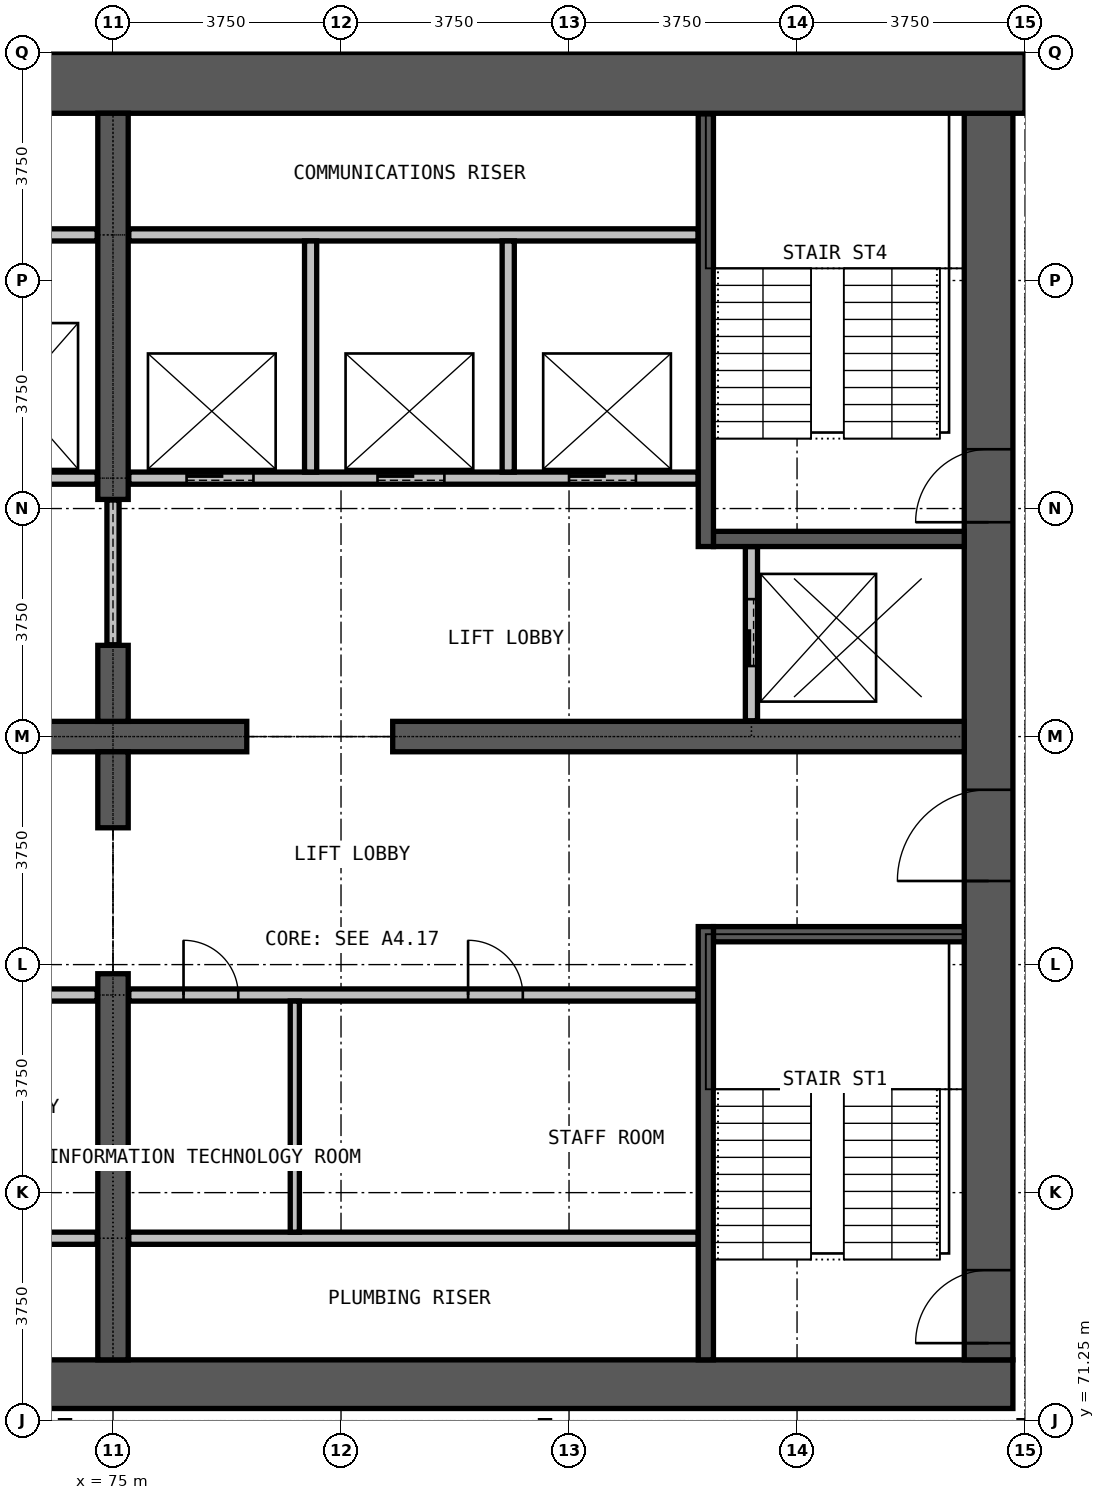
"""IFC4 building model, lengths in metres.
Left out: names, types, materials, properties, quantities, classifications, styles, units other than length and angle.
Written with IfcOpenShell. Run it as: python <this file> out.ifc"""

import sys

from ifc_helpers import new_model, si_unit, direction, frame, frame_2d, origin, place, context, subcontext, project, spatial, rectangle, extrude, element, fill, save


model = new_model("IFC4")
c1 = context("Model", 3, precision=1e-05, world=origin(), true_north=direction((0.0, 1.0)))
c2 = subcontext(c1, "Body", "Model", "MODEL_VIEW")
j1 = project(units=[si_unit("LENGTHUNIT", "METRE"), si_unit("PLANEANGLEUNIT", "RADIAN")], contexts=[c1])
p1 = place(None, origin())
s1 = spatial("IfcSite", under=j1, at=p1, CompositionType="ELEMENT")
p2 = place(p1, origin())
s2 = spatial("IfcBuilding", under=s1, at=p2, CompositionType="ELEMENT")
p3 = place(p2, frame((0.0, 0.0, 162.1)))
s3 = spatial("IfcBuildingStorey", under=s2, at=p3, CompositionType="ELEMENT", Elevation=162.1)
p4 = place(p3, frame((60.2, 71.85, 0.0), z_axis=(0.0, 0.0, 1.0), x_axis=(1.0, 0.0, 0.0)))
e1 = element("IfcWall", 1, at=p4, inside=s3, PredefinedType="SHEAR", context=c2, shape_type="SweptSolid", body=[
    extrude(rectangle(XDim=29.6, YDim=0.8, at=frame_2d((14.8, 0.0))), origin(), (0.0, 0.0, 1.0), 3.6),
])
p5 = place(p3, frame((89.4, 72.25, 0.0), z_axis=(0.0, 0.0, 1.0), x_axis=(0.0, 1.0, 0.0)))
e2 = element("IfcWall", 2, at=p5, inside=s3, PredefinedType="SHEAR", context=c2, shape_type="SweptSolid", body=[
    extrude(rectangle(XDim=20.5, YDim=0.8, at=frame_2d((10.25, 0.0))), origin(), (0.0, 0.0, 1.0), 3.6),
])
p6 = place(p5, frame((0.275, 0.0, 0.0)))
e3 = element("IfcOpeningElement", 3, at=p6, cuts=e2, PredefinedType="OPENING", context=c2, shape_type="SweptSolid", body=[
    extrude(rectangle(XDim=1.2, YDim=2.2, at=frame_2d((0.6, 1.1))), frame((0.0, 0.41, 0.0), z_axis=(0.0, -1.0, 0.0), x_axis=(1.0, 0.0, 0.0)), (0.0, 0.0, 1.0), 0.82),
])
p7 = place(p5, frame((13.775, 0.0, 0.0)))
e4 = element("IfcOpeningElement", 4, at=p7, cuts=e2, PredefinedType="OPENING", context=c2, shape_type="SweptSolid", body=[
    extrude(rectangle(XDim=1.2, YDim=2.2, at=frame_2d((0.6, 1.1))), frame((0.0, 0.41, 0.0), z_axis=(0.0, -1.0, 0.0), x_axis=(1.0, 0.0, 0.0)), (0.0, 0.0, 1.0), 0.82),
])
p8 = place(p5, frame((7.875, 0.0, 0.0)))
e5 = element("IfcOpeningElement", 5, at=p8, cuts=e2, PredefinedType="OPENING", context=c2, shape_type="SweptSolid", body=[
    extrude(rectangle(XDim=1.5, YDim=2.2, at=frame_2d((0.75, 1.1))), frame((0.0, 0.41, 0.0), z_axis=(0.0, -1.0, 0.0), x_axis=(1.0, 0.0, 0.0)), (0.0, 0.0, 1.0), 0.82),
])
p9 = place(p3, frame((90.0, 93.25, 0.0), z_axis=(0.0, 0.0, 1.0), x_axis=(-1.0, 0.0, 0.0)))
e6 = element("IfcWall", 6, at=p9, inside=s3, PredefinedType="SHEAR", context=c2, shape_type="SweptSolid", body=[
    extrude(rectangle(XDim=30.0, YDim=1.0, at=frame_2d((15.0, 0.0))), origin(), (0.0, 0.0, 1.0), 3.6),
])
p10 = place(p3, frame((72.8, 82.5, 0.0), z_axis=(0.0, 0.0, 1.0), x_axis=(1.0, 0.0, 0.0)))
e7 = element("IfcWall", 7, at=p10, inside=s3, PredefinedType="SHEAR", context=c2, shape_type="SweptSolid", body=[
    extrude(rectangle(XDim=4.4, YDim=0.5, at=frame_2d((2.2, 0.0))), origin(), (0.0, 0.0, 1.0), 3.6),
])
p11 = place(p3, frame((79.6, 82.5, 0.0), z_axis=(0.0, 0.0, 1.0), x_axis=(1.0, 0.0, 0.0)))
e8 = element("IfcWall", 8, at=p11, inside=s3, PredefinedType="SHEAR", context=c2, shape_type="SweptSolid", body=[
    extrude(rectangle(XDim=9.4, YDim=0.5, at=frame_2d((4.7, 0.0))), origin(), (0.0, 0.0, 1.0), 3.6),
])
p12 = place(p3, frame((75.0, 72.25, 0.0), z_axis=(0.0, 0.0, 1.0), x_axis=(0.0, 1.0, 0.0)))
e9 = element("IfcWall", 9, at=p12, inside=s3, PredefinedType="SHEAR", context=c2, shape_type="SweptSolid", body=[
    extrude(rectangle(XDim=6.35, YDim=0.5, at=frame_2d((3.175, 0.0))), origin(), (0.0, 0.0, 1.0), 3.6),
])
for number, where, z_axis, x_axis in (
    (10, (75.0, 81.0, 0.0), (0.0, 0.0, 1.0), (0.0, 1.0, 0.0)),
    (11, (75.0, 82.75, 0.0), (0.0, 0.0, 1.0), (0.0, 1.0, 0.0)),
):
    element("IfcWall", number, at=place(p3, frame(where, z_axis=z_axis, x_axis=x_axis)), inside=s3, PredefinedType="SHEAR", context=c2, shape_type="SweptSolid", body=[
        extrude(rectangle(XDim=1.25, YDim=0.5, at=frame_2d((0.625, 0.0))), origin(), (0.0, 0.0, 1.0), 3.6),
    ])
p13 = place(p3, frame((75.0, 86.4, 0.0), z_axis=(0.0, 0.0, 1.0), x_axis=(0.0, 1.0, 0.0)))
e12 = element("IfcWall", 12, at=p13, inside=s3, PredefinedType="SHEAR", context=c2, shape_type="SweptSolid", body=[
    extrude(rectangle(XDim=6.35, YDim=0.5, at=frame_2d((3.175, 0.0))), origin(), (0.0, 0.0, 1.0), 3.6),
])
for number, where, z_axis, x_axis in (
    (13, (65.375, 74.25, 0.0), (0.0, 0.0, 1.0), (1.0, 0.0, 0.0)),
    (14, (75.26, 74.25, 0.0), (0.0, 0.0, 1.0), (1.0, 0.0, 0.0)),
):
    element("IfcWall", number, at=place(p3, frame(where, z_axis=z_axis, x_axis=x_axis)), inside=s3, PredefinedType="PARTITIONING", context=c2, shape_type="SweptSolid", body=[
        extrude(rectangle(XDim=9.365, YDim=0.2, at=frame_2d((4.683, 0.0))), origin(), (0.0, 0.0, 1.0), 3.3),
    ])
p14 = place(p3, frame((65.375, 78.25, 0.0), z_axis=(0.0, 0.0, 1.0), x_axis=(1.0, 0.0, 0.0)))
e15 = element("IfcWall", 15, at=p14, inside=s3, PredefinedType="PARTITIONING", context=c2, shape_type="SweptSolid", body=[
    extrude(rectangle(XDim=9.365, YDim=0.2, at=frame_2d((4.683, 0.0))), origin(), (0.0, 0.0, 1.0), 3.3),
])
p15 = place(p14, frame((1.9, 0.0, 0.0)))
e16 = element("IfcOpeningElement", 16, at=p15, cuts=e15, PredefinedType="OPENING", context=c2, shape_type="SweptSolid", body=[
    extrude(rectangle(XDim=0.9, YDim=2.2, at=frame_2d((0.45, 1.1))), frame((0.0, 0.11, 0.0), z_axis=(0.0, -1.0, 0.0), x_axis=(1.0, 0.0, 0.0)), (0.0, 0.0, 1.0), 0.22),
])
p16 = place(p14, frame((6.6, 0.0, 0.0)))
e17 = element("IfcOpeningElement", 17, at=p16, cuts=e15, PredefinedType="OPENING", context=c2, shape_type="SweptSolid", body=[
    extrude(rectangle(XDim=0.9, YDim=2.2, at=frame_2d((0.45, 1.1))), frame((0.0, 0.11, 0.0), z_axis=(0.0, -1.0, 0.0), x_axis=(1.0, 0.0, 0.0)), (0.0, 0.0, 1.0), 0.22),
])
p17 = place(p3, frame((75.26, 78.25, 0.0), z_axis=(0.0, 0.0, 1.0), x_axis=(1.0, 0.0, 0.0)))
e18 = element("IfcWall", 18, at=p17, inside=s3, PredefinedType="PARTITIONING", context=c2, shape_type="SweptSolid", body=[
    extrude(rectangle(XDim=9.365, YDim=0.2, at=frame_2d((4.683, 0.0))), origin(), (0.0, 0.0, 1.0), 3.3),
])
p18 = place(p17, frame((0.9, 0.0, 0.0)))
e19 = element("IfcOpeningElement", 19, at=p18, cuts=e18, PredefinedType="OPENING", context=c2, shape_type="SweptSolid", body=[
    extrude(rectangle(XDim=0.9, YDim=2.2, at=frame_2d((0.45, 1.1))), frame((0.0, 0.11, 0.0), z_axis=(0.0, -1.0, 0.0), x_axis=(1.0, 0.0, 0.0)), (0.0, 0.0, 1.0), 0.22),
])
p19 = place(p17, frame((5.58, 0.0, 0.0)))
e20 = element("IfcOpeningElement", 20, at=p19, cuts=e18, PredefinedType="OPENING", context=c2, shape_type="SweptSolid", body=[
    extrude(rectangle(XDim=0.9, YDim=2.2, at=frame_2d((0.45, 1.1))), frame((0.0, 0.11, 0.0), z_axis=(0.0, -1.0, 0.0), x_axis=(1.0, 0.0, 0.0)), (0.0, 0.0, 1.0), 0.22),
])
p20 = place(p3, frame((75.0, 84.01, 0.0), z_axis=(0.0, 0.0, 1.0), x_axis=(0.0, 1.0, 0.0)))
e21 = element("IfcWall", 21, at=p20, inside=s3, PredefinedType="PARTITIONING", context=c2, shape_type="SweptSolid", body=[
    extrude(rectangle(XDim=2.38, YDim=0.2, at=frame_2d((1.19, 0.0))), origin(), (0.0, 0.0, 1.0), 2.4),
])
p21 = place(p3, frame((77.99, 74.35, 0.0), z_axis=(0.0, 0.0, 1.0), x_axis=(0.0, 1.0, 0.0)))
e22 = element("IfcWall", 22, at=p21, inside=s3, PredefinedType="PARTITIONING", context=c2, shape_type="SweptSolid", body=[
    extrude(rectangle(XDim=3.8, YDim=0.15, at=frame_2d((1.9, 0.0))), origin(), (0.0, 0.0, 1.0), 3.3),
])
p22 = place(p3, frame((65.375, 86.75, 0.0), z_axis=(0.0, 0.0, 1.0), x_axis=(1.0, 0.0, 0.0)))
e23 = element("IfcWall", 23, at=p22, inside=s3, PredefinedType="PARTITIONING", context=c2, shape_type="SweptSolid", body=[
    extrude(rectangle(XDim=9.365, YDim=0.2, at=frame_2d((4.683, 0.0))), origin(), (0.0, 0.0, 1.0), 3.3),
])
p23 = place(p22, frame((1.0, 0.0, 0.0)))
e24 = element("IfcOpeningElement", 24, at=p23, cuts=e23, PredefinedType="OPENING", context=c2, shape_type="SweptSolid", body=[
    extrude(rectangle(XDim=1.1, YDim=2.2, at=frame_2d((0.55, 1.1))), frame((0.0, 0.11, 0.0), z_axis=(0.0, -1.0, 0.0), x_axis=(1.0, 0.0, 0.0)), (0.0, 0.0, 1.0), 0.22),
])
p24 = place(p22, frame((4.175, 0.0, 0.0)))
e25 = element("IfcOpeningElement", 25, at=p24, cuts=e23, PredefinedType="OPENING", context=c2, shape_type="SweptSolid", body=[
    extrude(rectangle(XDim=1.1, YDim=2.2, at=frame_2d((0.55, 1.1))), frame((0.0, 0.11, 0.0), z_axis=(0.0, -1.0, 0.0), x_axis=(1.0, 0.0, 0.0)), (0.0, 0.0, 1.0), 0.22),
])
p25 = place(p22, frame((7.325, 0.0, 0.0)))
e26 = element("IfcOpeningElement", 26, at=p25, cuts=e23, PredefinedType="OPENING", context=c2, shape_type="SweptSolid", body=[
    extrude(rectangle(XDim=1.1, YDim=2.2, at=frame_2d((0.55, 1.1))), frame((0.0, 0.11, 0.0), z_axis=(0.0, -1.0, 0.0), x_axis=(1.0, 0.0, 0.0)), (0.0, 0.0, 1.0), 0.22),
])
p26 = place(p3, frame((75.26, 86.75, 0.0), z_axis=(0.0, 0.0, 1.0), x_axis=(1.0, 0.0, 0.0)))
e27 = element("IfcWall", 27, at=p26, inside=s3, PredefinedType="PARTITIONING", context=c2, shape_type="SweptSolid", body=[
    extrude(rectangle(XDim=9.365, YDim=0.2, at=frame_2d((4.683, 0.0))), origin(), (0.0, 0.0, 1.0), 3.3),
])
p27 = place(p26, frame((0.95, 0.0, 0.0)))
e28 = element("IfcOpeningElement", 28, at=p27, cuts=e27, PredefinedType="OPENING", context=c2, shape_type="SweptSolid", body=[
    extrude(rectangle(XDim=1.1, YDim=2.2, at=frame_2d((0.55, 1.1))), frame((0.0, 0.11, 0.0), z_axis=(0.0, -1.0, 0.0), x_axis=(1.0, 0.0, 0.0)), (0.0, 0.0, 1.0), 0.22),
])
p28 = place(p26, frame((4.09, 0.0, 0.0)))
e29 = element("IfcOpeningElement", 29, at=p28, cuts=e27, PredefinedType="OPENING", context=c2, shape_type="SweptSolid", body=[
    extrude(rectangle(XDim=1.1, YDim=2.2, at=frame_2d((0.55, 1.1))), frame((0.0, 0.11, 0.0), z_axis=(0.0, -1.0, 0.0), x_axis=(1.0, 0.0, 0.0)), (0.0, 0.0, 1.0), 0.22),
])
p29 = place(p26, frame((7.24, 0.0, 0.0)))
e30 = element("IfcOpeningElement", 30, at=p29, cuts=e27, PredefinedType="OPENING", context=c2, shape_type="SweptSolid", body=[
    extrude(rectangle(XDim=1.1, YDim=2.2, at=frame_2d((0.55, 1.1))), frame((0.0, 0.11, 0.0), z_axis=(0.0, -1.0, 0.0), x_axis=(1.0, 0.0, 0.0)), (0.0, 0.0, 1.0), 0.22),
])
for number, where, z_axis, x_axis in (
    (31, (65.375, 90.75, 0.0), (0.0, 0.0, 1.0), (1.0, 0.0, 0.0)),
    (32, (75.26, 90.75, 0.0), (0.0, 0.0, 1.0), (1.0, 0.0, 0.0)),
):
    element("IfcWall", number, at=place(p3, frame(where, z_axis=z_axis, x_axis=x_axis)), inside=s3, PredefinedType="PARTITIONING", context=c2, shape_type="SweptSolid", body=[
        extrude(rectangle(XDim=9.365, YDim=0.2, at=frame_2d((4.683, 0.0))), origin(), (0.0, 0.0, 1.0), 3.3),
    ])
for number, where, z_axis, x_axis in (
    (33, (78.25, 86.85, 0.0), (0.0, 0.0, 1.0), (0.0, 1.0, 0.0)),
    (34, (81.5, 86.85, 0.0), (0.0, 0.0, 1.0), (0.0, 1.0, 0.0)),
):
    element("IfcWall", number, at=place(p3, frame(where, z_axis=z_axis, x_axis=x_axis)), inside=s3, PredefinedType="PARTITIONING", context=c2, shape_type="SweptSolid", body=[
        extrude(rectangle(XDim=3.8, YDim=0.2, at=frame_2d((1.9, 0.0))), origin(), (0.0, 0.0, 1.0), 3.3),
    ])
p30 = place(p3, frame((85.5, 82.76, 0.0), z_axis=(0.0, 0.0, 1.0), x_axis=(0.0, 1.0, 0.0)))
e35 = element("IfcWall", 35, at=p30, inside=s3, PredefinedType="PARTITIONING", context=c2, shape_type="SweptSolid", body=[
    extrude(rectangle(XDim=2.865, YDim=0.2, at=frame_2d((1.433, 0.0))), origin(), (0.0, 0.0, 1.0), 3.3),
])
p31 = place(p30, frame((0.9, 0.0, 0.0)))
e36 = element("IfcOpeningElement", 36, at=p31, cuts=e35, PredefinedType="OPENING", context=c2, shape_type="SweptSolid", body=[
    extrude(rectangle(XDim=1.1, YDim=2.2, at=frame_2d((0.55, 1.1))), frame((0.0, 0.11, 0.0), z_axis=(0.0, -1.0, 0.0), x_axis=(1.0, 0.0, 0.0)), (0.0, 0.0, 1.0), 0.22),
])
for number, where, z_axis, x_axis in (
    (37, (84.875, 79.25, 0.0), (0.0, 0.0, 1.0), (1.0, 0.0, 0.0)),
    (38, (84.875, 85.75, 0.0), (0.0, 0.0, 1.0), (1.0, 0.0, 0.0)),
):
    element("IfcWall", number, at=place(p3, frame(where, z_axis=z_axis, x_axis=x_axis)), inside=s3, PredefinedType="PARTITIONING", context=c2, shape_type="SweptSolid", body=[
        extrude(rectangle(XDim=4.125, YDim=0.25, at=frame_2d((2.062, 0.0))), origin(), (0.0, 0.0, 1.0), 3.3),
    ])
p32 = place(p3, frame((84.75, 72.25, 0.0), z_axis=(0.0, 0.0, 1.0), x_axis=(0.0, 1.0, 0.0)))
e39 = element("IfcWall", 39, at=p32, inside=s3, PredefinedType="PARTITIONING", context=c2, shape_type="SweptSolid", body=[
    extrude(rectangle(XDim=7.125, YDim=0.25, at=frame_2d((3.562, 0.0))), origin(), (0.0, 0.0, 1.0), 3.3),
])
p33 = place(p3, frame((84.75, 85.625, 0.0), z_axis=(0.0, 0.0, 1.0), x_axis=(0.0, 1.0, 0.0)))
e40 = element("IfcWall", 40, at=p33, inside=s3, PredefinedType="PARTITIONING", context=c2, shape_type="SweptSolid", body=[
    extrude(rectangle(XDim=7.115, YDim=0.25, at=frame_2d((3.558, 0.0))), origin(), (0.0, 0.0, 1.0), 3.3),
])
p34 = place(p27, origin())
e41 = element("IfcDoor", 41, at=p34, inside=s3, OperationType="DOUBLE_DOOR_SLIDING", PredefinedType="DOOR", context=c2, shape_type="SweptSolid", body=[
    extrude(rectangle(XDim=1.1, YDim=2.2, at=frame_2d((0.55, 1.1))), frame((0.0, 0.025, 0.0), z_axis=(0.0, -1.0, 0.0), x_axis=(1.0, 0.0, 0.0)), (0.0, 0.0, 1.0), 0.05),
])
fill(e28, e41)
p35 = place(p28, origin())
e42 = element("IfcDoor", 42, at=p35, inside=s3, OperationType="DOUBLE_DOOR_SLIDING", PredefinedType="DOOR", context=c2, shape_type="SweptSolid", body=[
    extrude(rectangle(XDim=1.1, YDim=2.2, at=frame_2d((0.55, 1.1))), frame((0.0, 0.025, 0.0), z_axis=(0.0, -1.0, 0.0), x_axis=(1.0, 0.0, 0.0)), (0.0, 0.0, 1.0), 0.05),
])
fill(e29, e42)
p36 = place(p29, origin())
e43 = element("IfcDoor", 43, at=p36, inside=s3, OperationType="DOUBLE_DOOR_SLIDING", PredefinedType="DOOR", context=c2, shape_type="SweptSolid", body=[
    extrude(rectangle(XDim=1.1, YDim=2.2, at=frame_2d((0.55, 1.1))), frame((0.0, 0.025, 0.0), z_axis=(0.0, -1.0, 0.0), x_axis=(1.0, 0.0, 0.0)), (0.0, 0.0, 1.0), 0.05),
])
fill(e30, e43)
p37 = place(p31, origin())
e44 = element("IfcDoor", 44, at=p37, inside=s3, OperationType="DOUBLE_DOOR_SLIDING", PredefinedType="DOOR", context=c2, shape_type="SweptSolid", body=[
    extrude(rectangle(XDim=1.1, YDim=2.2, at=frame_2d((0.55, 1.1))), frame((0.0, 0.025, 0.0), z_axis=(0.0, -1.0, 0.0), x_axis=(1.0, 0.0, 0.0)), (0.0, 0.0, 1.0), 0.05),
])
fill(e36, e44)
p38 = place(p6, origin())
e45 = element("IfcDoor", 45, at=p38, inside=s3, OperationType="SINGLE_SWING_LEFT", PredefinedType="DOOR", context=c2, shape_type="SweptSolid", body=[
    extrude(rectangle(XDim=1.2, YDim=2.2, at=frame_2d((0.6, 1.1))), frame((0.0, 0.025, 0.0), z_axis=(0.0, -1.0, 0.0), x_axis=(1.0, 0.0, 0.0)), (0.0, 0.0, 1.0), 0.05),
])
fill(e3, e45)
p39 = place(p7, origin())
e46 = element("IfcDoor", 46, at=p39, inside=s3, OperationType="SINGLE_SWING_LEFT", PredefinedType="DOOR", context=c2, shape_type="SweptSolid", body=[
    extrude(rectangle(XDim=1.2, YDim=2.2, at=frame_2d((0.6, 1.1))), frame((0.0, 0.025, 0.0), z_axis=(0.0, -1.0, 0.0), x_axis=(1.0, 0.0, 0.0)), (0.0, 0.0, 1.0), 0.05),
])
fill(e4, e46)
p40 = place(p8, origin())
e47 = element("IfcDoor", 47, at=p40, inside=s3, OperationType="DOUBLE_DOOR_SINGLE_SWING", PredefinedType="DOOR", context=c2, shape_type="SweptSolid", body=[
    extrude(rectangle(XDim=1.5, YDim=2.2, at=frame_2d((0.75, 1.1))), frame((0.0, 0.025, 0.0), z_axis=(0.0, -1.0, 0.0), x_axis=(1.0, 0.0, 0.0)), (0.0, 0.0, 1.0), 0.05),
])
fill(e5, e47)
p41 = place(p18, origin())
e48 = element("IfcDoor", 48, at=p41, inside=s3, OperationType="SINGLE_SWING_RIGHT", PredefinedType="DOOR", context=c2, shape_type="SweptSolid", body=[
    extrude(rectangle(XDim=0.9, YDim=2.2, at=frame_2d((0.45, 1.1))), frame((0.0, 0.025, 0.0), z_axis=(0.0, -1.0, 0.0), x_axis=(1.0, 0.0, 0.0)), (0.0, 0.0, 1.0), 0.05),
])
fill(e19, e48)
p42 = place(p19, origin())
e49 = element("IfcDoor", 49, at=p42, inside=s3, OperationType="SINGLE_SWING_RIGHT", PredefinedType="DOOR", context=c2, shape_type="SweptSolid", body=[
    extrude(rectangle(XDim=0.9, YDim=2.2, at=frame_2d((0.45, 1.1))), frame((0.0, 0.025, 0.0), z_axis=(0.0, -1.0, 0.0), x_axis=(1.0, 0.0, 0.0)), (0.0, 0.0, 1.0), 0.05),
])
fill(e20, e49)
save(model, sys.argv[1])
